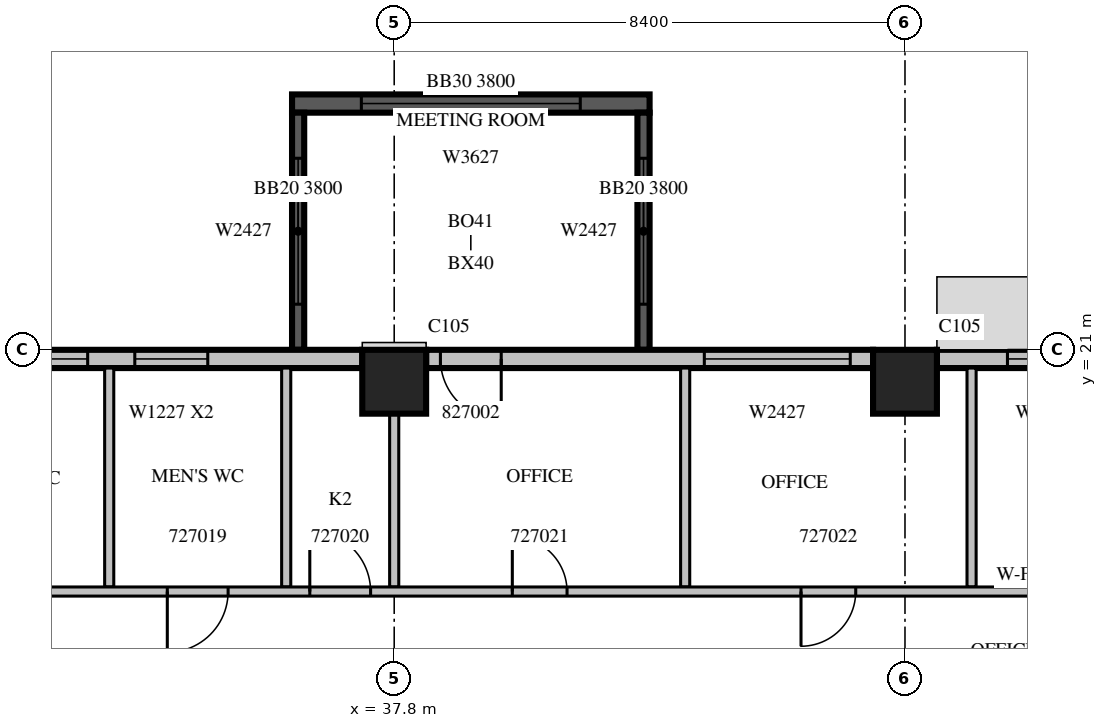
"""IFC4 building model, lengths in metres.
Left out: names, types, materials, properties, quantities, classifications, styles, units other than length and angle.
Written with IfcOpenShell. Run it as: python <this file> out.ifc"""

import sys

from ifc_helpers import new_model, si_unit, direction, frame, frame_2d, origin, origin_2d, place, context, subcontext, project, spatial, rectangle, extrude, source, transform, mapped, element, fill, save


model = new_model("IFC4")
c1 = context("Model", 3, precision=1e-05, world=origin(), true_north=direction((0.0, 1.0)))
c2 = subcontext(c1, "Body", "Model", "MODEL_VIEW")
j1 = project(units=[si_unit("LENGTHUNIT", "METRE"), si_unit("PLANEANGLEUNIT", "RADIAN")], contexts=[c1])
p1 = place(None, origin())
s1 = spatial("IfcSite", under=j1, at=p1, CompositionType="ELEMENT")
p2 = place(p1, origin())
s2 = spatial("IfcBuilding", under=s1, at=p2, CompositionType="ELEMENT")
p3 = place(p2, frame((0.0, 0.0, 124.5)))
s3 = spatial("IfcBuildingStorey", under=s2, at=p3, CompositionType="ELEMENT", Elevation=124.5)
m1 = source(origin(), c2, "Body", "SweptSolid", [
    extrude(rectangle(XDim=1.05, YDim=1.05, at=origin_2d()), origin(), (0.0, 0.0, 1.0), 4.2),
])
for number, where, z_axis, x_axis in (
    (1, (37.8, 20.475, 0.0), (0.0, 0.0, 1.0), (1.0, 0.0, 0.0)),
    (2, (46.2, 20.475, 0.0), (0.0, 0.0, 1.0), (1.0, 0.0, 0.0)),
):
    element("IfcColumn", number, at=place(p3, frame(where, z_axis=z_axis, x_axis=x_axis)), inside=s3, PredefinedType="COLUMN", context=c2, shape_type="MappedRepresentation", body=[
        mapped(m1, transform((0.0, 0.0, 0.0), scale=1.0)),
    ])
m2 = source(origin(), c2, "Body", "SweptSolid", [
    extrude(rectangle(XDim=5.88, YDim=0.3, at=frame_2d((2.94, 0.0))), origin(), (0.0, 0.0, 1.0), 3.8),
])
p4 = place(p3, frame((42.0, 25.05, 0.0), z_axis=(0.0, 0.0, 1.0), x_axis=(-1.0, 0.0, 0.0)))
e3 = element("IfcWall", 3, at=p4, inside=s3, PredefinedType="SOLIDWALL", context=c2, shape_type="MappedRepresentation", body=[
    mapped(m2, transform((0.0, 0.0, 0.0), scale=1.0)),
])
m3 = source(origin(), c2, "Body", "SweptSolid", [
    extrude(rectangle(XDim=3.6, YDim=2.7, at=frame_2d((1.8, 1.35))), frame((0.0, 0.16, 0.0), z_axis=(0.0, -1.0, 0.0), x_axis=(1.0, 0.0, 0.0)), (0.0, 0.0, 1.0), 0.32),
])
p5 = place(p4, frame((1.14, 0.0, 0.6)))
e4 = element("IfcOpeningElement", 4, at=p5, cuts=e3, PredefinedType="OPENING", context=c2, shape_type="MappedRepresentation", body=[
    mapped(m3, transform((0.0, 0.0, 0.0), scale=1.0)),
])
m4 = source(origin(), c2, "Body", "SweptSolid", [
    extrude(rectangle(XDim=3.9, YDim=0.2, at=frame_2d((1.95, 0.0))), origin(), (0.0, 0.0, 1.0), 3.8),
])
p6 = place(p3, frame((41.9, 21.0, 0.0), z_axis=(0.0, 0.0, 1.0), x_axis=(0.0, 1.0, 0.0)))
e5 = element("IfcWall", 5, at=p6, inside=s3, PredefinedType="SOLIDWALL", context=c2, shape_type="MappedRepresentation", body=[
    mapped(m4, transform((0.0, 0.0, 0.0), scale=1.0)),
])
m5 = source(origin(), c2, "Body", "SweptSolid", [
    extrude(rectangle(XDim=2.4, YDim=2.7, at=frame_2d((1.2, 1.35))), frame((0.0, 0.11, 0.0), z_axis=(0.0, -1.0, 0.0), x_axis=(1.0, 0.0, 0.0)), (0.0, 0.0, 1.0), 0.22),
])
p7 = place(p6, frame((0.75, 0.0, 0.6)))
e6 = element("IfcOpeningElement", 6, at=p7, cuts=e5, PredefinedType="OPENING", context=c2, shape_type="MappedRepresentation", body=[
    mapped(m5, transform((0.0, 0.0, 0.0), scale=1.0)),
])
p8 = place(p3, frame((36.22, 21.0, 0.0), z_axis=(0.0, 0.0, 1.0), x_axis=(0.0, 1.0, 0.0)))
e7 = element("IfcWall", 7, at=p8, inside=s3, PredefinedType="SOLIDWALL", context=c2, shape_type="MappedRepresentation", body=[
    mapped(m4, transform((0.0, 0.0, 0.0), scale=1.0)),
])
p9 = place(p8, frame((0.75, 0.0, 0.6)))
e8 = element("IfcOpeningElement", 8, at=p9, cuts=e7, PredefinedType="OPENING", context=c2, shape_type="MappedRepresentation", body=[
    mapped(m5, transform((0.0, 0.0, 0.0), scale=1.0)),
])
m6 = source(origin(), c2, "Body", "SweptSolid", [
    extrude(rectangle(XDim=4.83, YDim=0.3, at=frame_2d((2.415, 0.0))), origin(), (0.0, 0.0, 1.0), 3.8),
])
p10 = place(p3, frame((51.555, 20.85, 0.0), z_axis=(0.0, 0.0, 1.0), x_axis=(-1.0, 0.0, 0.0)))
e9 = element("IfcWall", 9, at=p10, inside=s3, PredefinedType="STANDARD", context=c2, shape_type="MappedRepresentation", body=[
    mapped(m6, transform((0.0, 0.0, 0.0), scale=1.0)),
])
m7 = source(origin(), c2, "Body", "SweptSolid", [
    extrude(rectangle(XDim=1.2, YDim=2.7, at=frame_2d((0.6, 1.35))), frame((0.0, 0.16, 0.0), z_axis=(0.0, -1.0, 0.0), x_axis=(1.0, 0.0, 0.0)), (0.0, 0.0, 1.0), 0.32),
])
p11 = place(p10, frame((2.47, 0.0, 0.6)))
e10 = element("IfcOpeningElement", 10, at=p11, cuts=e9, PredefinedType="OPENING", context=c2, shape_type="MappedRepresentation", body=[
    mapped(m7, transform((0.0, 0.0, 0.0), scale=1.0)),
])
m8 = source(origin(), c2, "Body", "SweptSolid", [
    extrude(rectangle(XDim=7.35, YDim=0.3, at=frame_2d((3.675, 0.0))), origin(), (0.0, 0.0, 1.0), 3.8),
])
p12 = place(p3, frame((45.675, 20.85, 0.0), z_axis=(0.0, 0.0, 1.0), x_axis=(-1.0, 0.0, 0.0)))
e11 = element("IfcWall", 11, at=p12, inside=s3, PredefinedType="STANDARD", context=c2, shape_type="MappedRepresentation", body=[
    mapped(m8, transform((0.0, 0.0, 0.0), scale=1.0)),
])
m9 = source(origin(), c2, "Body", "SweptSolid", [
    extrude(rectangle(XDim=2.4, YDim=2.7, at=frame_2d((1.2, 1.35))), frame((0.0, 0.16, 0.0), z_axis=(0.0, -1.0, 0.0), x_axis=(1.0, 0.0, 0.0)), (0.0, 0.0, 1.0), 0.32),
])
p13 = place(p12, frame((0.375, 0.0, 0.6)))
e12 = element("IfcOpeningElement", 12, at=p13, cuts=e11, PredefinedType="OPENING", context=c2, shape_type="MappedRepresentation", body=[
    mapped(m9, transform((0.0, 0.0, 0.0), scale=1.0)),
])
m10 = source(origin(), c2, "Body", "SweptSolid", [
    extrude(rectangle(XDim=1.0, YDim=2.1, at=frame_2d((0.5, 1.05))), frame((0.0, 0.16, 0.0), z_axis=(0.0, -1.0, 0.0), x_axis=(1.0, 0.0, 0.0)), (0.0, 0.0, 1.0), 0.32),
])
p14 = place(p12, frame((6.115, 0.0, 0.0)))
e13 = element("IfcOpeningElement", 13, at=p14, cuts=e11, PredefinedType="OPENING", context=c2, shape_type="MappedRepresentation", body=[
    mapped(m10, transform((0.0, 0.0, 0.0), scale=1.0)),
])
m11 = source(origin(), c2, "Body", "SweptSolid", [
    extrude(rectangle(XDim=7.035, YDim=0.3, at=frame_2d((3.518, 0.0))), origin(), (0.0, 0.0, 1.0), 3.8),
])
p15 = place(p3, frame((37.275, 20.85, 0.0), z_axis=(0.0, 0.0, 1.0), x_axis=(-1.0, 0.0, 0.0)))
e14 = element("IfcWall", 14, at=p15, inside=s3, PredefinedType="STANDARD", context=c2, shape_type="MappedRepresentation", body=[
    mapped(m11, transform((0.0, 0.0, 0.0), scale=1.0)),
])
p16 = place(p15, frame((2.541, 0.0, 0.6)))
e15 = element("IfcOpeningElement", 15, at=p16, cuts=e14, PredefinedType="OPENING", context=c2, shape_type="MappedRepresentation", body=[
    mapped(m7, transform((0.0, 0.0, 0.0), scale=1.0)),
])
p17 = place(p15, frame((4.516, 0.0, 0.6)))
e16 = element("IfcOpeningElement", 16, at=p17, cuts=e14, PredefinedType="OPENING", context=c2, shape_type="MappedRepresentation", body=[
    mapped(m7, transform((0.0, 0.0, 0.0), scale=1.0)),
])
m12 = source(origin(), c2, "Body", "SweptSolid", [
    extrude(rectangle(XDim=3.6, YDim=0.15, at=frame_2d((1.8, 0.0))), origin(), (0.0, 0.0, 1.0), 3.8),
])
for number, where, z_axis, x_axis in (
    (17, (33.113, 20.7, 0.0), (0.0, 0.0, 1.0), (0.0, -1.0, 0.0)),
    (18, (36.024, 20.7, 0.0), (0.0, 0.0, 1.0), (0.0, -1.0, 0.0)),
    (19, (42.585, 20.7, 0.0), (0.0, 0.0, 1.0), (0.0, -1.0, 0.0)),
    (20, (47.295, 20.7, 0.0), (0.0, 0.0, 1.0), (0.0, -1.0, 0.0)),
):
    element("IfcWall", number, at=place(p3, frame(where, z_axis=z_axis, x_axis=x_axis)), inside=s3, PredefinedType="PARTITIONING", context=c2, shape_type="MappedRepresentation", body=[
        mapped(m12, transform((0.0, 0.0, 0.0), scale=1.0)),
    ])
m13 = source(origin(), c2, "Body", "SweptSolid", [
    extrude(rectangle(XDim=2.851, YDim=0.15, at=frame_2d((1.425, 0.0))), origin(), (0.0, 0.0, 1.0), 3.8),
])
p18 = place(p3, frame((37.8, 17.1, 0.0), z_axis=(0.0, 0.0, 1.0), x_axis=(0.0, 1.0, 0.0)))
e21 = element("IfcWall", 21, at=p18, inside=s3, PredefinedType="PARTITIONING", context=c2, shape_type="MappedRepresentation", body=[
    mapped(m13, transform((0.0, 0.0, 0.0), scale=1.0)),
])
m14 = source(origin(), c2, "Body", "SweptSolid", [
    extrude(rectangle(XDim=37.5, YDim=0.15, at=frame_2d((18.75, 0.0))), origin(), (0.0, 0.0, 1.0), 3.8),
])
p19 = place(p3, frame((29.4, 17.025, 0.0), z_axis=(0.0, 0.0, 1.0), x_axis=(1.0, 0.0, 0.0)))
e22 = element("IfcWall", 22, at=p19, inside=s3, PredefinedType="PARTITIONING", context=c2, shape_type="MappedRepresentation", body=[
    mapped(m14, transform((0.0, 0.0, 0.0), scale=1.0)),
])
m15 = source(origin(), c2, "Body", "SweptSolid", [
    extrude(rectangle(XDim=1.0, YDim=2.1, at=frame_2d((0.5, 1.05))), frame((0.0, 0.085, 0.0), z_axis=(0.0, -1.0, 0.0), x_axis=(1.0, 0.0, 0.0)), (0.0, 0.0, 1.0), 0.17),
])
p20 = place(p19, frame((1.357, 0.0, 0.0)))
e23 = element("IfcOpeningElement", 23, at=p20, cuts=e22, PredefinedType="OPENING", context=c2, shape_type="MappedRepresentation", body=[
    mapped(m15, transform((0.0, 0.0, 0.0), scale=1.0)),
])
p21 = place(p19, frame((4.669, 0.0, 0.0)))
e24 = element("IfcOpeningElement", 24, at=p21, cuts=e22, PredefinedType="OPENING", context=c2, shape_type="MappedRepresentation", body=[
    mapped(m15, transform((0.0, 0.0, 0.0), scale=1.0)),
])
p22 = place(p19, frame((7.012, 0.0, 0.0)))
e25 = element("IfcOpeningElement", 25, at=p22, cuts=e22, PredefinedType="OPENING", context=c2, shape_type="MappedRepresentation", body=[
    mapped(m15, transform((0.0, 0.0, 0.0), scale=1.0)),
])
m16 = source(origin(), c2, "Body", "SweptSolid", [
    extrude(rectangle(XDim=0.9, YDim=2.1, at=frame_2d((0.45, 1.05))), frame((0.0, 0.085, 0.0), z_axis=(0.0, -1.0, 0.0), x_axis=(1.0, 0.0, 0.0)), (0.0, 0.0, 1.0), 0.17),
])
p23 = place(p19, frame((10.342, 0.0, 0.0)))
e26 = element("IfcOpeningElement", 26, at=p23, cuts=e22, PredefinedType="OPENING", context=c2, shape_type="MappedRepresentation", body=[
    mapped(m16, transform((0.0, 0.0, 0.0), scale=1.0)),
])
p24 = place(p19, frame((15.09, 0.0, 0.0)))
e27 = element("IfcOpeningElement", 27, at=p24, cuts=e22, PredefinedType="OPENING", context=c2, shape_type="MappedRepresentation", body=[
    mapped(m16, transform((0.0, 0.0, 0.0), scale=1.0)),
])
p25 = place(p19, frame((19.837, 0.0, 0.0)))
e28 = element("IfcOpeningElement", 28, at=p25, cuts=e22, PredefinedType="OPENING", context=c2, shape_type="MappedRepresentation", body=[
    mapped(m16, transform((0.0, 0.0, 0.0), scale=1.0)),
])
p26 = place(p19, frame((25.12, 0.0, 0.0)))
e29 = element("IfcOpeningElement", 29, at=p26, cuts=e22, PredefinedType="OPENING", context=c2, shape_type="MappedRepresentation", body=[
    mapped(m15, transform((0.0, 0.0, 0.0), scale=1.0)),
])
p27 = place(p19, frame((30.364, 0.0, 0.0)))
e30 = element("IfcOpeningElement", 30, at=p27, cuts=e22, PredefinedType="OPENING", context=c2, shape_type="MappedRepresentation", body=[
    mapped(m16, transform((0.0, 0.0, 0.0), scale=1.0)),
])
p28 = place(p19, frame((34.871, 0.0, 0.0)))
e31 = element("IfcOpeningElement", 31, at=p28, cuts=e22, PredefinedType="OPENING", context=c2, shape_type="MappedRepresentation", body=[
    mapped(m16, transform((0.0, 0.0, 0.0), scale=1.0)),
])
m17 = source(origin(), c2, "Body", "SweptSolid", [
    extrude(rectangle(XDim=3.6, YDim=2.7, at=frame_2d((1.8, 1.35))), frame((0.0, 0.03, 0.0), z_axis=(0.0, -1.0, 0.0), x_axis=(1.0, 0.0, 0.0)), (0.0, 0.0, 1.0), 0.06),
])
p29 = place(p5, origin())
e32 = element("IfcWindow", 32, at=p29, inside=s3, PartitioningType="SINGLE_PANEL", PredefinedType="WINDOW", context=c2, shape_type="MappedRepresentation", body=[
    mapped(m17, transform((0.0, 0.0, 0.0), scale=1.0)),
])
fill(e4, e32)
m18 = source(origin(), c2, "Body", "SweptSolid", [
    extrude(rectangle(XDim=2.4, YDim=2.7, at=frame_2d((1.2, 1.35))), frame((0.0, 0.03, 0.0), z_axis=(0.0, -1.0, 0.0), x_axis=(1.0, 0.0, 0.0)), (0.0, 0.0, 1.0), 0.06),
])
p30 = place(p7, origin())
e33 = element("IfcWindow", 33, at=p30, inside=s3, PartitioningType="SINGLE_PANEL", PredefinedType="WINDOW", context=c2, shape_type="MappedRepresentation", body=[
    mapped(m18, transform((0.0, 0.0, 0.0), scale=1.0)),
])
fill(e6, e33)
p31 = place(p9, origin())
e34 = element("IfcWindow", 34, at=p31, inside=s3, PartitioningType="SINGLE_PANEL", PredefinedType="WINDOW", context=c2, shape_type="MappedRepresentation", body=[
    mapped(m18, transform((0.0, 0.0, 0.0), scale=1.0)),
])
fill(e8, e34)
m19 = source(origin(), c2, "Body", "SweptSolid", [
    extrude(rectangle(XDim=1.2, YDim=2.7, at=frame_2d((0.6, 1.35))), frame((0.0, 0.03, 0.0), z_axis=(0.0, -1.0, 0.0), x_axis=(1.0, 0.0, 0.0)), (0.0, 0.0, 1.0), 0.06),
])
p32 = place(p11, origin())
e35 = element("IfcWindow", 35, at=p32, inside=s3, PartitioningType="SINGLE_PANEL", PredefinedType="WINDOW", context=c2, shape_type="MappedRepresentation", body=[
    mapped(m19, transform((0.0, 0.0, 0.0), scale=1.0)),
])
fill(e10, e35)
p33 = place(p13, origin())
e36 = element("IfcWindow", 36, at=p33, inside=s3, PartitioningType="SINGLE_PANEL", PredefinedType="WINDOW", context=c2, shape_type="MappedRepresentation", body=[
    mapped(m18, transform((0.0, 0.0, 0.0), scale=1.0)),
])
fill(e12, e36)
p34 = place(p16, origin())
e37 = element("IfcWindow", 37, at=p34, inside=s3, PartitioningType="SINGLE_PANEL", PredefinedType="WINDOW", context=c2, shape_type="MappedRepresentation", body=[
    mapped(m19, transform((0.0, 0.0, 0.0), scale=1.0)),
])
fill(e15, e37)
p35 = place(p17, origin())
e38 = element("IfcWindow", 38, at=p35, inside=s3, PartitioningType="SINGLE_PANEL", PredefinedType="WINDOW", context=c2, shape_type="MappedRepresentation", body=[
    mapped(m19, transform((0.0, 0.0, 0.0), scale=1.0)),
])
fill(e16, e38)
m20 = source(origin(), c2, "Body", "SweptSolid", [
    extrude(rectangle(XDim=1.0, YDim=2.1, at=frame_2d((0.5, 1.05))), frame((0.0, 0.025, 0.0), z_axis=(0.0, -1.0, 0.0), x_axis=(1.0, 0.0, 0.0)), (0.0, 0.0, 1.0), 0.05),
])
p36 = place(p21, origin())
e39 = element("IfcDoor", 39, at=p36, inside=s3, OperationType="SINGLE_SWING_RIGHT", PredefinedType="DOOR", context=c2, shape_type="MappedRepresentation", body=[
    mapped(m20, transform((0.0, 0.0, 0.0), scale=1.0)),
])
fill(e24, e39)
p37 = place(p22, origin())
e40 = element("IfcDoor", 40, at=p37, inside=s3, OperationType="SINGLE_SWING_LEFT", PredefinedType="DOOR", context=c2, shape_type="MappedRepresentation", body=[
    mapped(m20, transform((0.0, 0.0, 0.0), scale=1.0)),
])
fill(e25, e40)
m21 = source(origin(), c2, "Body", "SweptSolid", [
    extrude(rectangle(XDim=0.9, YDim=2.1, at=frame_2d((0.45, 1.05))), frame((0.0, 0.025, 0.0), z_axis=(0.0, -1.0, 0.0), x_axis=(1.0, 0.0, 0.0)), (0.0, 0.0, 1.0), 0.05),
])
p38 = place(p23, origin())
e41 = element("IfcDoor", 41, at=p38, inside=s3, OperationType="SINGLE_SWING_LEFT", PredefinedType="DOOR", context=c2, shape_type="MappedRepresentation", body=[
    mapped(m21, transform((0.0, 0.0, 0.0), scale=1.0)),
])
fill(e26, e41)
p39 = place(p24, origin())
e42 = element("IfcDoor", 42, at=p39, inside=s3, OperationType="SINGLE_SWING_RIGHT", PredefinedType="DOOR", context=c2, shape_type="MappedRepresentation", body=[
    mapped(m21, transform((0.0, 0.0, 0.0), scale=1.0)),
])
fill(e27, e42)
p40 = place(p14, origin())
e43 = element("IfcDoor", 43, at=p40, inside=s3, OperationType="SINGLE_SWING_LEFT", PredefinedType="DOOR", context=c2, shape_type="MappedRepresentation", body=[
    mapped(m20, transform((0.0, 0.0, 0.0), scale=1.0)),
])
fill(e13, e43)
save(model, sys.argv[1])
